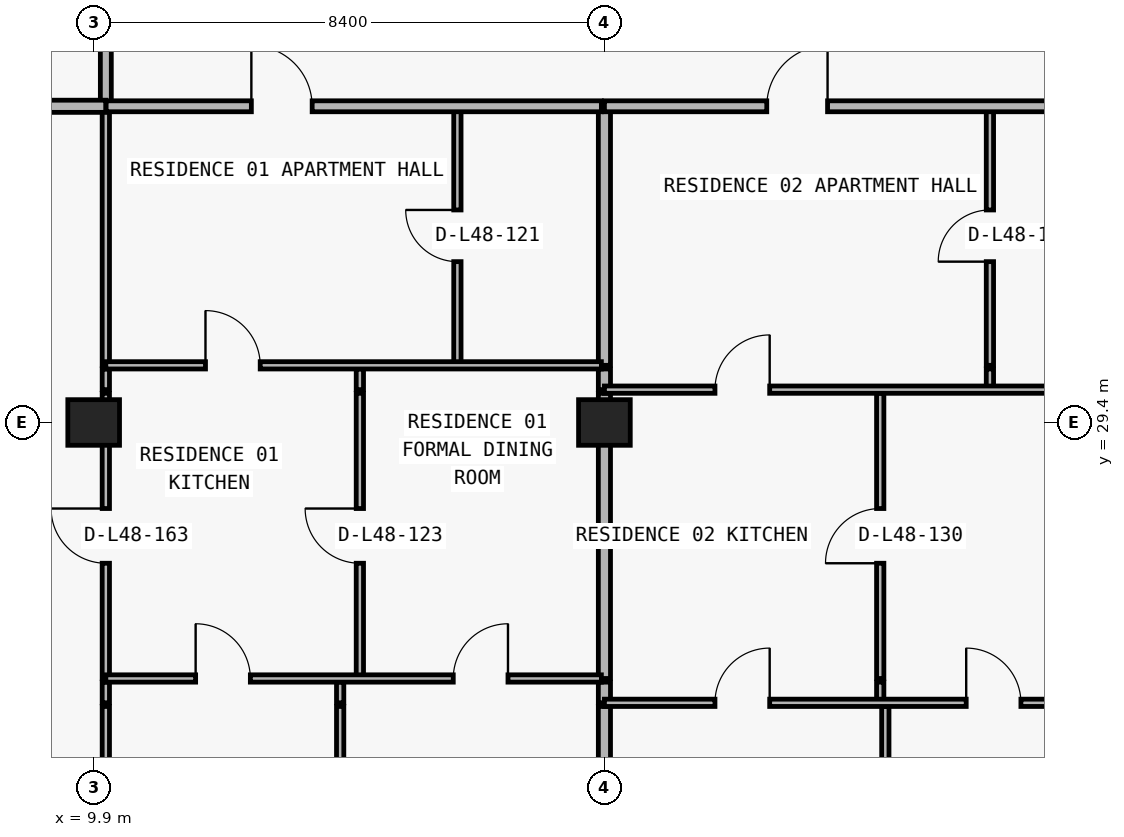
"""IFC4 building model, lengths in metres.
Left out: names, types, materials, properties, quantities, classifications, styles, units other than length and angle.
Written with IfcOpenShell. Run it as: python <this file> out.ifc"""

import sys

from ifc_helpers import new_model, si_unit, direction, frame, frame_2d, origin, origin_2d, place, context, subcontext, project, spatial, rectangle, extrude, element, fill, save


model = new_model("IFC4")
c1 = context("Model", 3, precision=1e-05, world=origin(), true_north=direction((0.0, 1.0)))
c2 = subcontext(c1, "Body", "Model", "MODEL_VIEW")
j1 = project(units=[si_unit("LENGTHUNIT", "METRE"), si_unit("PLANEANGLEUNIT", "RADIAN")], contexts=[c1])
p1 = place(None, origin())
s1 = spatial("IfcSite", under=j1, at=p1, CompositionType="ELEMENT")
p2 = place(p1, origin())
s2 = spatial("IfcBuilding", under=s1, at=p2, CompositionType="ELEMENT")
p3 = place(p2, frame((0.0, 0.0, 173.7)))
s3 = spatial("IfcBuildingStorey", under=s2, at=p3, CompositionType="ELEMENT", Elevation=173.7)
for number, where, z_axis, x_axis in (
    (1, (9.9, 29.4, 0.0), (0.0, 0.0, 1.0), (1.0, 0.0, 0.0)),
    (2, (18.3, 29.4, 0.0), (0.0, 0.0, 1.0), (1.0, 0.0, 0.0)),
):
    element("IfcColumn", number, at=place(p3, frame(where, z_axis=z_axis, x_axis=x_axis)), inside=s3, PredefinedType="COLUMN", context=c2, shape_type="SweptSolid", body=[
        extrude(rectangle(XDim=0.85, YDim=0.75, at=origin_2d()), origin(), (0.0, 0.0, 1.0), 3.05),
    ])
p4 = place(p3, frame((10.1, 11.285, 0.0), z_axis=(0.0, 0.0, 1.0), x_axis=(0.0, 1.0, 0.0)))
e3 = element("IfcWall", 3, at=p4, inside=s3, PredefinedType="PARTITIONING", context=c2, shape_type="SweptSolid", body=[
    extrude(rectangle(XDim=13.445, YDim=0.12, at=frame_2d((6.723, 0.0))), origin(), (0.0, 0.0, 1.0), 2.263),
])
p5 = place(p3, frame((10.1, 24.79, 0.0), z_axis=(0.0, 0.0, 1.0), x_axis=(0.0, 1.0, 0.0)))
e4 = element("IfcWall", 4, at=p5, inside=s3, PredefinedType="PARTITIONING", context=c2, shape_type="SweptSolid", body=[
    extrude(rectangle(XDim=0.34, YDim=0.12, at=frame_2d((0.17, 0.0))), origin(), (0.0, 0.0, 1.0), 2.263),
])
p6 = place(p3, frame((10.1, 25.19, 0.0), z_axis=(0.0, 0.0, 1.0), x_axis=(0.0, 1.0, 0.0)))
e5 = element("IfcWall", 5, at=p6, inside=s3, PredefinedType="PARTITIONING", context=c2, shape_type="SweptSolid", body=[
    extrude(rectangle(XDim=4.69, YDim=0.12, at=frame_2d((2.345, 0.0))), origin(), (0.0, 0.0, 1.0), 2.263),
])
p7 = place(p6, frame((1.895, 0.0, 0.0)))
e6 = element("IfcOpeningElement", 6, at=p7, cuts=e5, PredefinedType="OPENING", context=c2, shape_type="SweptSolid", body=[
    extrude(rectangle(XDim=0.9, YDim=2.15, at=frame_2d((0.45, 1.075))), frame((0.0, 0.07, 0.0), z_axis=(0.0, -1.0, 0.0), x_axis=(1.0, 0.0, 0.0)), (0.0, 0.0, 1.0), 0.14),
])
p8 = place(p3, frame((10.1, 29.94, 0.0), z_axis=(0.0, 0.0, 1.0), x_axis=(0.0, 1.0, 0.0)))
e7 = element("IfcWall", 7, at=p8, inside=s3, PredefinedType="PARTITIONING", context=c2, shape_type="SweptSolid", body=[
    extrude(rectangle(XDim=0.34, YDim=0.12, at=frame_2d((0.17, 0.0))), origin(), (0.0, 0.0, 1.0), 2.263),
])
p9 = place(p3, frame((10.1, 30.34, 0.0), z_axis=(0.0, 0.0, 1.0), x_axis=(0.0, 1.0, 0.0)))
e8 = element("IfcWall", 8, at=p9, inside=s3, PredefinedType="PARTITIONING", context=c2, shape_type="SweptSolid", body=[
    extrude(rectangle(XDim=4.26, YDim=0.12, at=frame_2d((2.13, 0.0))), origin(), (0.0, 0.0, 1.0), 2.263),
])
p10 = place(p3, frame((10.1, 34.605, 0.0), z_axis=(0.0, 0.0, 1.0), x_axis=(0.0, 1.0, 0.0)))
e9 = element("IfcWall", 9, at=p10, inside=s3, PredefinedType="PARTITIONING", context=c2, shape_type="SweptSolid", body=[
    extrude(rectangle(XDim=2.345, YDim=0.18, at=frame_2d((1.172, 0.0))), origin(), (0.0, 0.0, 1.0), 2.263),
])
p11 = place(p3, frame((13.954, 11.24, 0.0), z_axis=(0.0, 0.0, 1.0), x_axis=(0.0, 1.0, 0.0)))
e10 = element("IfcWall", 10, at=p11, inside=s3, PredefinedType="PARTITIONING", context=c2, shape_type="SweptSolid", body=[
    extrude(rectangle(XDim=13.49, YDim=0.12, at=frame_2d((6.745, 0.0))), origin(), (0.0, 0.0, 1.0), 3.05),
])
p12 = place(p3, frame((13.954, 24.79, 0.0), z_axis=(0.0, 0.0, 1.0), x_axis=(0.0, 1.0, 0.0)))
e11 = element("IfcWall", 11, at=p12, inside=s3, PredefinedType="PARTITIONING", context=c2, shape_type="SweptSolid", body=[
    extrude(rectangle(XDim=0.34, YDim=0.12, at=frame_2d((0.17, 0.0))), origin(), (0.0, 0.0, 1.0), 3.05),
])
p13 = place(p3, frame((14.278, 25.19, 0.0), z_axis=(0.0, 0.0, 1.0), x_axis=(0.0, 1.0, 0.0)))
e12 = element("IfcWall", 12, at=p13, inside=s3, PredefinedType="PARTITIONING", context=c2, shape_type="SweptSolid", body=[
    extrude(rectangle(XDim=4.69, YDim=0.12, at=frame_2d((2.345, 0.0))), origin(), (0.0, 0.0, 1.0), 3.05),
])
p14 = place(p13, frame((1.895, 0.0, 0.0)))
e13 = element("IfcOpeningElement", 13, at=p14, cuts=e12, PredefinedType="OPENING", context=c2, shape_type="SweptSolid", body=[
    extrude(rectangle(XDim=0.9, YDim=2.15, at=frame_2d((0.45, 1.075))), frame((0.0, 0.07, 0.0), z_axis=(0.0, -1.0, 0.0), x_axis=(1.0, 0.0, 0.0)), (0.0, 0.0, 1.0), 0.14),
])
p15 = place(p3, frame((14.278, 29.94, 0.0), z_axis=(0.0, 0.0, 1.0), x_axis=(0.0, 1.0, 0.0)))
e14 = element("IfcWall", 14, at=p15, inside=s3, PredefinedType="PARTITIONING", context=c2, shape_type="SweptSolid", body=[
    extrude(rectangle(XDim=0.34, YDim=0.12, at=frame_2d((0.17, 0.0))), origin(), (0.0, 0.0, 1.0), 3.05),
])
p16 = place(p3, frame((15.882, 30.34, 0.0), z_axis=(0.0, 0.0, 1.0), x_axis=(0.0, 1.0, 0.0)))
e15 = element("IfcWall", 15, at=p16, inside=s3, PredefinedType="PARTITIONING", context=c2, shape_type="SweptSolid", body=[
    extrude(rectangle(XDim=4.26, YDim=0.12, at=frame_2d((2.13, 0.0))), origin(), (0.0, 0.0, 1.0), 3.05),
])
p17 = place(p16, frame((1.705, 0.0, 0.0)))
e16 = element("IfcOpeningElement", 16, at=p17, cuts=e15, PredefinedType="OPENING", context=c2, shape_type="SweptSolid", body=[
    extrude(rectangle(XDim=0.85, YDim=2.1, at=frame_2d((0.425, 1.05))), frame((0.0, 0.07, 0.0), z_axis=(0.0, -1.0, 0.0), x_axis=(1.0, 0.0, 0.0)), (0.0, 0.0, 1.0), 0.14),
])
p18 = place(p3, frame((18.3, 11.24, 0.0), z_axis=(0.0, 0.0, 1.0), x_axis=(0.0, 1.0, 0.0)))
e17 = element("IfcWall", 17, at=p18, inside=s3, PredefinedType="PARTITIONING", context=c2, shape_type="SweptSolid", body=[
    extrude(rectangle(XDim=13.49, YDim=0.2, at=frame_2d((6.745, 0.0))), origin(), (0.0, 0.0, 1.0), 2.263),
])
p19 = place(p3, frame((18.3, 24.79, 0.0), z_axis=(0.0, 0.0, 1.0), x_axis=(0.0, 1.0, 0.0)))
e18 = element("IfcWall", 18, at=p19, inside=s3, PredefinedType="PARTITIONING", context=c2, shape_type="SweptSolid", body=[
    extrude(rectangle(XDim=0.34, YDim=0.2, at=frame_2d((0.17, 0.0))), origin(), (0.0, 0.0, 1.0), 2.263),
])
p20 = place(p3, frame((18.3, 25.19, 0.0), z_axis=(0.0, 0.0, 1.0), x_axis=(0.0, 1.0, 0.0)))
e19 = element("IfcWall", 19, at=p20, inside=s3, PredefinedType="PARTITIONING", context=c2, shape_type="SweptSolid", body=[
    extrude(rectangle(XDim=4.69, YDim=0.2, at=frame_2d((2.345, 0.0))), origin(), (0.0, 0.0, 1.0), 2.263),
])
p21 = place(p3, frame((18.3, 29.94, 0.0), z_axis=(0.0, 0.0, 1.0), x_axis=(0.0, 1.0, 0.0)))
e20 = element("IfcWall", 20, at=p21, inside=s3, PredefinedType="PARTITIONING", context=c2, shape_type="SweptSolid", body=[
    extrude(rectangle(XDim=0.34, YDim=0.2, at=frame_2d((0.17, 0.0))), origin(), (0.0, 0.0, 1.0), 2.263),
])
p22 = place(p3, frame((18.3, 30.34, 0.0), z_axis=(0.0, 0.0, 1.0), x_axis=(0.0, 1.0, 0.0)))
e21 = element("IfcWall", 21, at=p22, inside=s3, PredefinedType="PARTITIONING", context=c2, shape_type="SweptSolid", body=[
    extrude(rectangle(XDim=4.26, YDim=0.2, at=frame_2d((2.13, 0.0))), origin(), (0.0, 0.0, 1.0), 2.263),
])
p23 = place(p3, frame((22.836, 24.79, 0.0), z_axis=(0.0, 0.0, 1.0), x_axis=(0.0, 1.0, 0.0)))
e22 = element("IfcWall", 22, at=p23, inside=s3, PredefinedType="PARTITIONING", context=c2, shape_type="SweptSolid", body=[
    extrude(rectangle(XDim=0.34, YDim=0.12, at=frame_2d((0.17, 0.0))), origin(), (0.0, 0.0, 1.0), 3.05),
])
p24 = place(p3, frame((22.836, 25.19, 0.0), z_axis=(0.0, 0.0, 1.0), x_axis=(0.0, 1.0, 0.0)))
e23 = element("IfcWall", 23, at=p24, inside=s3, PredefinedType="PARTITIONING", context=c2, shape_type="SweptSolid", body=[
    extrude(rectangle(XDim=4.69, YDim=0.12, at=frame_2d((2.345, 0.0))), origin(), (0.0, 0.0, 1.0), 3.05),
])
p25 = place(p24, frame((1.895, 0.0, 0.0)))
e24 = element("IfcOpeningElement", 24, at=p25, cuts=e23, PredefinedType="OPENING", context=c2, shape_type="SweptSolid", body=[
    extrude(rectangle(XDim=0.9, YDim=2.15, at=frame_2d((0.45, 1.075))), frame((0.0, 0.07, 0.0), z_axis=(0.0, -1.0, 0.0), x_axis=(1.0, 0.0, 0.0)), (0.0, 0.0, 1.0), 0.14),
])
p26 = place(p3, frame((22.92, 11.24, 0.0), z_axis=(0.0, 0.0, 1.0), x_axis=(0.0, 1.0, 0.0)))
e25 = element("IfcWall", 25, at=p26, inside=s3, PredefinedType="PARTITIONING", context=c2, shape_type="SweptSolid", body=[
    extrude(rectangle(XDim=13.49, YDim=0.12, at=frame_2d((6.745, 0.0))), origin(), (0.0, 0.0, 1.0), 3.05),
])
p27 = place(p3, frame((24.64, 29.94, 0.0), z_axis=(0.0, 0.0, 1.0), x_axis=(0.0, 1.0, 0.0)))
e26 = element("IfcWall", 26, at=p27, inside=s3, PredefinedType="PARTITIONING", context=c2, shape_type="SweptSolid", body=[
    extrude(rectangle(XDim=0.34, YDim=0.12, at=frame_2d((0.17, 0.0))), origin(), (0.0, 0.0, 1.0), 3.05),
])
p28 = place(p3, frame((24.64, 30.34, 0.0), z_axis=(0.0, 0.0, 1.0), x_axis=(0.0, 1.0, 0.0)))
e27 = element("IfcWall", 27, at=p28, inside=s3, PredefinedType="PARTITIONING", context=c2, shape_type="SweptSolid", body=[
    extrude(rectangle(XDim=4.26, YDim=0.12, at=frame_2d((2.13, 0.0))), origin(), (0.0, 0.0, 1.0), 3.05),
])
p29 = place(p28, frame((1.705, 0.0, 0.0)))
e28 = element("IfcOpeningElement", 28, at=p29, cuts=e27, PredefinedType="OPENING", context=c2, shape_type="SweptSolid", body=[
    extrude(rectangle(XDim=0.85, YDim=2.1, at=frame_2d((0.425, 1.05))), frame((0.0, 0.07, 0.0), z_axis=(0.0, -1.0, 0.0), x_axis=(1.0, 0.0, 0.0)), (0.0, 0.0, 1.0), 0.14),
])
p30 = place(p3, frame((18.3, 24.79, 0.0), z_axis=(0.0, 0.0, 1.0), x_axis=(1.0, 0.0, 0.0)))
e29 = element("IfcWall", 29, at=p30, inside=s3, PredefinedType="PARTITIONING", context=c2, shape_type="SweptSolid", body=[
    extrude(rectangle(XDim=8.18, YDim=0.12, at=frame_2d((4.09, 0.0))), origin(), (0.0, 0.0, 1.0), 3.05),
])
p31 = place(p30, frame((1.818, 0.0, 0.0)))
e30 = element("IfcOpeningElement", 30, at=p31, cuts=e29, PredefinedType="OPENING", context=c2, shape_type="SweptSolid", body=[
    extrude(rectangle(XDim=0.9, YDim=2.15, at=frame_2d((0.45, 1.075))), frame((0.0, 0.07, 0.0), z_axis=(0.0, -1.0, 0.0), x_axis=(1.0, 0.0, 0.0)), (0.0, 0.0, 1.0), 0.14),
])
p32 = place(p30, frame((5.95, 0.0, 0.0)))
e31 = element("IfcOpeningElement", 31, at=p32, cuts=e29, PredefinedType="OPENING", context=c2, shape_type="SweptSolid", body=[
    extrude(rectangle(XDim=0.9, YDim=2.15, at=frame_2d((0.45, 1.075))), frame((0.0, 0.07, 0.0), z_axis=(0.0, -1.0, 0.0), x_axis=(1.0, 0.0, 0.0)), (0.0, 0.0, 1.0), 0.14),
])
p33 = place(p3, frame((10.1, 25.19, 0.0), z_axis=(0.0, 0.0, 1.0), x_axis=(1.0, 0.0, 0.0)))
e32 = element("IfcWall", 32, at=p33, inside=s3, PredefinedType="PARTITIONING", context=c2, shape_type="SweptSolid", body=[
    extrude(rectangle(XDim=8.15, YDim=0.12, at=frame_2d((4.075, 0.0))), origin(), (0.0, 0.0, 1.0), 3.05),
])
p34 = place(p33, frame((1.477, 0.0, 0.0)))
e33 = element("IfcOpeningElement", 33, at=p34, cuts=e32, PredefinedType="OPENING", context=c2, shape_type="SweptSolid", body=[
    extrude(rectangle(XDim=0.9, YDim=2.15, at=frame_2d((0.45, 1.075))), frame((0.0, 0.07, 0.0), z_axis=(0.0, -1.0, 0.0), x_axis=(1.0, 0.0, 0.0)), (0.0, 0.0, 1.0), 0.14),
])
p35 = place(p33, frame((5.714, 0.0, 0.0)))
e34 = element("IfcOpeningElement", 34, at=p35, cuts=e32, PredefinedType="OPENING", context=c2, shape_type="SweptSolid", body=[
    extrude(rectangle(XDim=0.9, YDim=2.15, at=frame_2d((0.45, 1.075))), frame((0.0, 0.07, 0.0), z_axis=(0.0, -1.0, 0.0), x_axis=(1.0, 0.0, 0.0)), (0.0, 0.0, 1.0), 0.14),
])
p36 = place(p3, frame((18.3, 29.94, 0.0), z_axis=(0.0, 0.0, 1.0), x_axis=(1.0, 0.0, 0.0)))
e35 = element("IfcWall", 35, at=p36, inside=s3, PredefinedType="PARTITIONING", context=c2, shape_type="SweptSolid", body=[
    extrude(rectangle(XDim=8.4, YDim=0.12, at=frame_2d((4.2, 0.0))), origin(), (0.0, 0.0, 1.0), 3.05),
])
p37 = place(p36, frame((1.818, 0.0, 0.0)))
e36 = element("IfcOpeningElement", 36, at=p37, cuts=e35, PredefinedType="OPENING", context=c2, shape_type="SweptSolid", body=[
    extrude(rectangle(XDim=0.9, YDim=2.15, at=frame_2d((0.45, 1.075))), frame((0.0, 0.07, 0.0), z_axis=(0.0, -1.0, 0.0), x_axis=(1.0, 0.0, 0.0)), (0.0, 0.0, 1.0), 0.14),
])
p38 = place(p3, frame((10.1, 30.34, 0.0), z_axis=(0.0, 0.0, 1.0), x_axis=(1.0, 0.0, 0.0)))
e37 = element("IfcWall", 37, at=p38, inside=s3, PredefinedType="PARTITIONING", context=c2, shape_type="SweptSolid", body=[
    extrude(rectangle(XDim=8.15, YDim=0.12, at=frame_2d((4.075, 0.0))), origin(), (0.0, 0.0, 1.0), 3.05),
])
p39 = place(p38, frame((1.639, 0.0, 0.0)))
e38 = element("IfcOpeningElement", 38, at=p39, cuts=e37, PredefinedType="OPENING", context=c2, shape_type="SweptSolid", body=[
    extrude(rectangle(XDim=0.9, YDim=2.15, at=frame_2d((0.45, 1.075))), frame((0.0, 0.07, 0.0), z_axis=(0.0, -1.0, 0.0), x_axis=(1.0, 0.0, 0.0)), (0.0, 0.0, 1.0), 0.14),
])
p40 = place(p3, frame((6.395, 34.6, 0.0), z_axis=(0.0, 0.0, 1.0), x_axis=(1.0, 0.0, 0.0)))
e39 = element("IfcWall", 39, at=p40, inside=s3, PredefinedType="PARTITIONING", context=c2, shape_type="SweptSolid", body=[
    extrude(rectangle(XDim=3.705, YDim=0.2, at=frame_2d((1.853, 0.0))), origin(), (0.0, 0.0, 1.0), 3.05),
])
p41 = place(p3, frame((10.105, 34.6, 0.0), z_axis=(0.0, 0.0, 1.0), x_axis=(1.0, 0.0, 0.0)))
e40 = element("IfcWall", 40, at=p41, inside=s3, PredefinedType="PARTITIONING", context=c2, shape_type="SweptSolid", body=[
    extrude(rectangle(XDim=8.145, YDim=0.18, at=frame_2d((4.073, 0.0))), origin(), (0.0, 0.0, 1.0), 3.05),
])
p42 = place(p41, frame((2.388, 0.0, 0.0)))
e41 = element("IfcOpeningElement", 41, at=p42, cuts=e40, PredefinedType="OPENING", context=c2, shape_type="SweptSolid", body=[
    extrude(rectangle(XDim=1.0, YDim=2.2, at=frame_2d((0.5, 1.1))), frame((0.0, 0.1, 0.0), z_axis=(0.0, -1.0, 0.0), x_axis=(1.0, 0.0, 0.0)), (0.0, 0.0, 1.0), 0.2),
])
p43 = place(p3, frame((18.3, 34.6, 0.0), z_axis=(0.0, 0.0, 1.0), x_axis=(1.0, 0.0, 0.0)))
e42 = element("IfcWall", 42, at=p43, inside=s3, PredefinedType="PARTITIONING", context=c2, shape_type="SweptSolid", body=[
    extrude(rectangle(XDim=41.2, YDim=0.18, at=frame_2d((20.6, 0.0))), origin(), (0.0, 0.0, 1.0), 3.05),
])
p44 = place(p43, frame((2.67, 0.0, 0.0)))
e43 = element("IfcOpeningElement", 43, at=p44, cuts=e42, PredefinedType="OPENING", context=c2, shape_type="SweptSolid", body=[
    extrude(rectangle(XDim=1.0, YDim=2.2, at=frame_2d((0.5, 1.1))), frame((0.0, 0.1, 0.0), z_axis=(0.0, -1.0, 0.0), x_axis=(1.0, 0.0, 0.0)), (0.0, 0.0, 1.0), 0.2),
])
p45 = place(p43, frame((11.212, 0.0, 0.0)))
e44 = element("IfcOpeningElement", 44, at=p45, cuts=e42, PredefinedType="OPENING", context=c2, shape_type="SweptSolid", body=[
    extrude(rectangle(XDim=1.0, YDim=2.2, at=frame_2d((0.5, 1.1))), frame((0.0, 0.1, 0.0), z_axis=(0.0, -1.0, 0.0), x_axis=(1.0, 0.0, 0.0)), (0.0, 0.0, 1.0), 0.2),
])
p46 = place(p43, frame((35.483, 0.0, 0.0)))
e45 = element("IfcOpeningElement", 45, at=p46, cuts=e42, PredefinedType="OPENING", context=c2, shape_type="SweptSolid", body=[
    extrude(rectangle(XDim=1.0, YDim=2.2, at=frame_2d((0.5, 1.1))), frame((0.0, 0.1, 0.0), z_axis=(0.0, -1.0, 0.0), x_axis=(1.0, 0.0, 0.0)), (0.0, 0.0, 1.0), 0.2),
])
p47 = place(p42, origin())
e46 = element("IfcDoor", 46, at=p47, inside=s3, OperationType="SINGLE_SWING_LEFT", PredefinedType="DOOR", context=c2, shape_type="SweptSolid", body=[
    extrude(rectangle(XDim=1.0, YDim=2.2, at=frame_2d((0.5, 1.1))), frame((0.0, 0.025, 0.0), z_axis=(0.0, -1.0, 0.0), x_axis=(1.0, 0.0, 0.0)), (0.0, 0.0, 1.0), 0.05),
])
fill(e41, e46)
p48 = place(p17, origin())
e47 = element("IfcDoor", 47, at=p48, inside=s3, OperationType="SINGLE_SWING_RIGHT", PredefinedType="DOOR", context=c2, shape_type="SweptSolid", body=[
    extrude(rectangle(XDim=0.85, YDim=2.1, at=frame_2d((0.425, 1.05))), frame((0.0, 0.025, 0.0), z_axis=(0.0, -1.0, 0.0), x_axis=(1.0, 0.0, 0.0)), (0.0, 0.0, 1.0), 0.05),
])
fill(e16, e47)
p49 = place(p39, origin())
e48 = element("IfcDoor", 48, at=p49, inside=s3, OperationType="SINGLE_SWING_LEFT", PredefinedType="DOOR", context=c2, shape_type="SweptSolid", body=[
    extrude(rectangle(XDim=0.9, YDim=2.15, at=frame_2d((0.45, 1.075))), frame((0.0, 0.025, 0.0), z_axis=(0.0, -1.0, 0.0), x_axis=(1.0, 0.0, 0.0)), (0.0, 0.0, 1.0), 0.05),
])
fill(e38, e48)
p50 = place(p14, origin())
e49 = element("IfcDoor", 49, at=p50, inside=s3, OperationType="SINGLE_SWING_RIGHT", PredefinedType="DOOR", context=c2, shape_type="SweptSolid", body=[
    extrude(rectangle(XDim=0.9, YDim=2.15, at=frame_2d((0.45, 1.075))), frame((0.0, 0.025, 0.0), z_axis=(0.0, -1.0, 0.0), x_axis=(1.0, 0.0, 0.0)), (0.0, 0.0, 1.0), 0.05),
])
fill(e13, e49)
p51 = place(p34, origin())
e50 = element("IfcDoor", 50, at=p51, inside=s3, OperationType="SINGLE_SWING_LEFT", PredefinedType="DOOR", context=c2, shape_type="SweptSolid", body=[
    extrude(rectangle(XDim=0.9, YDim=2.15, at=frame_2d((0.45, 1.075))), frame((0.0, 0.025, 0.0), z_axis=(0.0, -1.0, 0.0), x_axis=(1.0, 0.0, 0.0)), (0.0, 0.0, 1.0), 0.05),
])
fill(e33, e50)
p52 = place(p35, origin())
e51 = element("IfcDoor", 51, at=p52, inside=s3, OperationType="SINGLE_SWING_RIGHT", PredefinedType="DOOR", context=c2, shape_type="SweptSolid", body=[
    extrude(rectangle(XDim=0.9, YDim=2.15, at=frame_2d((0.45, 1.075))), frame((0.0, 0.025, 0.0), z_axis=(0.0, -1.0, 0.0), x_axis=(1.0, 0.0, 0.0)), (0.0, 0.0, 1.0), 0.05),
])
fill(e34, e51)
p53 = place(p44, origin())
e52 = element("IfcDoor", 52, at=p53, inside=s3, OperationType="SINGLE_SWING_RIGHT", PredefinedType="DOOR", context=c2, shape_type="SweptSolid", body=[
    extrude(rectangle(XDim=1.0, YDim=2.2, at=frame_2d((0.5, 1.1))), frame((0.0, 0.025, 0.0), z_axis=(0.0, -1.0, 0.0), x_axis=(1.0, 0.0, 0.0)), (0.0, 0.0, 1.0), 0.05),
])
fill(e43, e52)
p54 = place(p29, origin())
e53 = element("IfcDoor", 53, at=p54, inside=s3, OperationType="SINGLE_SWING_LEFT", PredefinedType="DOOR", context=c2, shape_type="SweptSolid", body=[
    extrude(rectangle(XDim=0.85, YDim=2.1, at=frame_2d((0.425, 1.05))), frame((0.0, 0.025, 0.0), z_axis=(0.0, -1.0, 0.0), x_axis=(1.0, 0.0, 0.0)), (0.0, 0.0, 1.0), 0.05),
])
fill(e28, e53)
p55 = place(p37, origin())
e54 = element("IfcDoor", 54, at=p55, inside=s3, OperationType="SINGLE_SWING_RIGHT", PredefinedType="DOOR", context=c2, shape_type="SweptSolid", body=[
    extrude(rectangle(XDim=0.9, YDim=2.15, at=frame_2d((0.45, 1.075))), frame((0.0, 0.025, 0.0), z_axis=(0.0, -1.0, 0.0), x_axis=(1.0, 0.0, 0.0)), (0.0, 0.0, 1.0), 0.05),
])
fill(e36, e54)
p56 = place(p25, origin())
e55 = element("IfcDoor", 55, at=p56, inside=s3, OperationType="SINGLE_SWING_LEFT", PredefinedType="DOOR", context=c2, shape_type="SweptSolid", body=[
    extrude(rectangle(XDim=0.9, YDim=2.15, at=frame_2d((0.45, 1.075))), frame((0.0, 0.025, 0.0), z_axis=(0.0, -1.0, 0.0), x_axis=(1.0, 0.0, 0.0)), (0.0, 0.0, 1.0), 0.05),
])
fill(e24, e55)
p57 = place(p31, origin())
e56 = element("IfcDoor", 56, at=p57, inside=s3, OperationType="SINGLE_SWING_RIGHT", PredefinedType="DOOR", context=c2, shape_type="SweptSolid", body=[
    extrude(rectangle(XDim=0.9, YDim=2.15, at=frame_2d((0.45, 1.075))), frame((0.0, 0.025, 0.0), z_axis=(0.0, -1.0, 0.0), x_axis=(1.0, 0.0, 0.0)), (0.0, 0.0, 1.0), 0.05),
])
fill(e30, e56)
p58 = place(p32, origin())
e57 = element("IfcDoor", 57, at=p58, inside=s3, OperationType="SINGLE_SWING_LEFT", PredefinedType="DOOR", context=c2, shape_type="SweptSolid", body=[
    extrude(rectangle(XDim=0.9, YDim=2.15, at=frame_2d((0.45, 1.075))), frame((0.0, 0.025, 0.0), z_axis=(0.0, -1.0, 0.0), x_axis=(1.0, 0.0, 0.0)), (0.0, 0.0, 1.0), 0.05),
])
fill(e31, e57)
p59 = place(p7, origin())
e58 = element("IfcDoor", 58, at=p59, inside=s3, OperationType="SINGLE_SWING_RIGHT", PredefinedType="DOOR", context=c2, shape_type="SweptSolid", body=[
    extrude(rectangle(XDim=0.9, YDim=2.15, at=frame_2d((0.45, 1.075))), frame((0.0, 0.025, 0.0), z_axis=(0.0, -1.0, 0.0), x_axis=(1.0, 0.0, 0.0)), (0.0, 0.0, 1.0), 0.05),
])
fill(e6, e58)
save(model, sys.argv[1])
